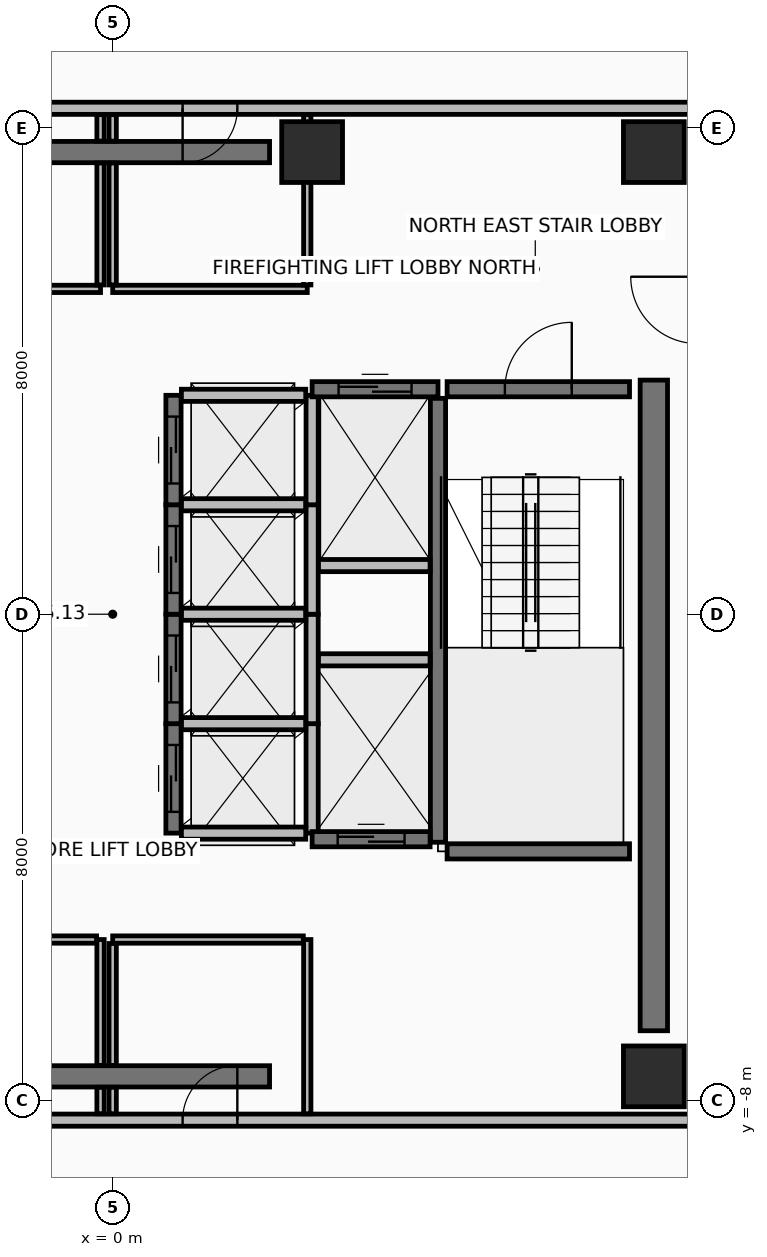
"""IFC4 building model, lengths in metres.
Left out: names, types, materials, properties, quantities, classifications, styles, units other than length and angle.
Written with IfcOpenShell. Run it as: python <this file> out.ifc"""

import sys

from ifc_helpers import new_model, si_unit, direction, frame, frame_2d, origin, origin_2d, place, context, subcontext, project, spatial, rectangle, extrude, element, fill, save


model = new_model("IFC4")
c1 = context("Model", 3, precision=1e-05, world=origin(), true_north=direction((0.0, 1.0)))
c2 = subcontext(c1, "Body", "Model", "MODEL_VIEW")
j1 = project(units=[si_unit("LENGTHUNIT", "METRE"), si_unit("PLANEANGLEUNIT", "RADIAN")], contexts=[c1])
p1 = place(None, origin())
s1 = spatial("IfcSite", under=j1, at=p1, CompositionType="ELEMENT")
p2 = place(p1, origin())
s2 = spatial("IfcBuilding", under=s1, at=p2, CompositionType="ELEMENT")
p3 = place(p2, frame((0.0, 0.0, 302.15)))
s3 = spatial("IfcBuildingStorey", under=s2, at=p3, CompositionType="ELEMENT", Elevation=302.15)
for number, where, z_axis, x_axis in (
    (1, (8.9, -7.6, 0.0), (0.0, 0.0, 1.0), (1.0, 0.0, 0.0)),
    (2, (8.9, 7.6, 0.0), (0.0, 0.0, 1.0), (1.0, 0.0, 0.0)),
    (3, (3.28, 7.6, 0.0), (0.0, 0.0, 1.0), (1.0, 0.0, 0.0)),
):
    element("IfcColumn", number, at=place(p3, frame(where, z_axis=z_axis, x_axis=x_axis)), inside=s3, PredefinedType="COLUMN", context=c2, shape_type="SweptSolid", body=[
        extrude(rectangle(XDim=1.0, YDim=1.0, at=origin_2d()), origin(), (0.0, 0.0, 1.0), 4.15),
    ])
for number, where, z_axis, x_axis in (
    (4, (-2.8, -7.6, 0.0), (0.0, 0.0, 1.0), (1.0, 0.0, 0.0)),
    (5, (-2.8, 7.6, 0.0), (0.0, 0.0, 1.0), (1.0, 0.0, 0.0)),
):
    element("IfcWall", number, at=place(p3, frame(where, z_axis=z_axis, x_axis=x_axis)), inside=s3, PredefinedType="SHEAR", context=c2, shape_type="SweptSolid", body=[
        extrude(rectangle(XDim=5.38, YDim=0.35, at=frame_2d((2.69, 0.0))), origin(), (0.0, 0.0, 1.0), 3.95),
    ])
p4 = place(p3, frame((8.9, -6.85, 0.0), z_axis=(0.0, 0.0, 1.0), x_axis=(0.0, 1.0, 0.0)))
e6 = element("IfcWall", 6, at=p4, inside=s3, PredefinedType="SHEAR", context=c2, shape_type="SweptSolid", body=[
    extrude(rectangle(XDim=10.7, YDim=0.45, at=frame_2d((5.35, 0.0))), origin(), (0.0, 0.0, 1.0), 3.95),
])
p5 = place(p3, frame((-9.62, -8.32, 0.0), z_axis=(0.0, 0.0, 1.0), x_axis=(1.0, 0.0, 0.0)))
e7 = element("IfcWall", 7, at=p5, inside=s3, PredefinedType="PARTITIONING", context=c2, shape_type="SweptSolid", body=[
    extrude(rectangle(XDim=19.24, YDim=0.2, at=frame_2d((9.62, 0.0))), origin(), (0.0, 0.0, 1.0), 3.445),
])
p6 = place(p5, frame((7.37, 0.0, 0.0)))
e8 = element("IfcOpeningElement", 8, at=p6, cuts=e7, PredefinedType="OPENING", context=c2, shape_type="SweptSolid", body=[
    extrude(rectangle(XDim=0.9, YDim=2.1, at=frame_2d((0.45, 1.05))), frame((0.0, 0.11, 0.0), z_axis=(0.0, -1.0, 0.0), x_axis=(1.0, 0.0, 0.0)), (0.0, 0.0, 1.0), 0.22),
])
p7 = place(p5, frame((10.77, 0.0, 0.0)))
e9 = element("IfcOpeningElement", 9, at=p7, cuts=e7, PredefinedType="OPENING", context=c2, shape_type="SweptSolid", body=[
    extrude(rectangle(XDim=0.9, YDim=2.1, at=frame_2d((0.45, 1.05))), frame((0.0, 0.11, 0.0), z_axis=(0.0, -1.0, 0.0), x_axis=(1.0, 0.0, 0.0)), (0.0, 0.0, 1.0), 0.22),
])
p8 = place(p3, frame((9.62, 8.32, 0.0), z_axis=(0.0, 0.0, 1.0), x_axis=(-1.0, 0.0, 0.0)))
e10 = element("IfcWall", 10, at=p8, inside=s3, PredefinedType="PARTITIONING", context=c2, shape_type="SweptSolid", body=[
    extrude(rectangle(XDim=19.24, YDim=0.2, at=frame_2d((9.62, 0.0))), origin(), (0.0, 0.0, 1.0), 3.445),
])
p9 = place(p8, frame((10.97, 0.0, 0.0)))
e11 = element("IfcOpeningElement", 11, at=p9, cuts=e10, PredefinedType="OPENING", context=c2, shape_type="SweptSolid", body=[
    extrude(rectangle(XDim=0.9, YDim=2.1, at=frame_2d((0.45, 1.05))), frame((0.0, 0.11, 0.0), z_axis=(0.0, -1.0, 0.0), x_axis=(1.0, 0.0, 0.0)), (0.0, 0.0, 1.0), 0.22),
])
p10 = place(p8, frame((7.57, 0.0, 0.0)))
e12 = element("IfcOpeningElement", 12, at=p10, cuts=e10, PredefinedType="OPENING", context=c2, shape_type="SweptSolid", body=[
    extrude(rectangle(XDim=0.9, YDim=2.1, at=frame_2d((0.45, 1.05))), frame((0.0, 0.11, 0.0), z_axis=(0.0, -1.0, 0.0), x_axis=(1.0, 0.0, 0.0)), (0.0, 0.0, 1.0), 0.22),
])
p11 = place(p8, frame((15.02, 0.0, 0.0)))
e13 = element("IfcOpeningElement", 13, at=p11, cuts=e10, PredefinedType="OPENING", context=c2, shape_type="SweptSolid", body=[
    extrude(rectangle(XDim=0.9, YDim=2.1, at=frame_2d((0.45, 1.05))), frame((0.0, 0.11, 0.0), z_axis=(0.0, -1.0, 0.0), x_axis=(1.0, 0.0, 0.0)), (0.0, 0.0, 1.0), 0.22),
])
p12 = place(p3, frame((5.35, -3.75, 0.0), z_axis=(0.0, 0.0, 1.0), x_axis=(0.0, 1.0, 0.0)))
e14 = element("IfcWall", 14, at=p12, inside=s3, PredefinedType="SHEAR", context=c2, shape_type="SweptSolid", body=[
    extrude(rectangle(XDim=7.3, YDim=0.25, at=frame_2d((3.65, 0.0))), origin(), (0.0, 0.0, 1.0), 3.95),
])
p13 = place(p3, frame((5.5, 3.7, 0.0), z_axis=(0.0, 0.0, 1.0), x_axis=(1.0, 0.0, 0.0)))
e15 = element("IfcWall", 15, at=p13, inside=s3, PredefinedType="SHEAR", context=c2, shape_type="SweptSolid", body=[
    extrude(rectangle(XDim=3.0, YDim=0.25, at=frame_2d((1.5, 0.0))), origin(), (0.0, 0.0, 1.0), 3.95),
])
p14 = place(p13, frame((0.95, 0.0, 0.0)))
e16 = element("IfcOpeningElement", 16, at=p14, cuts=e15, PredefinedType="OPENING", context=c2, shape_type="SweptSolid", body=[
    extrude(rectangle(XDim=1.1, YDim=2.15, at=frame_2d((0.55, 1.075))), frame((0.0, 0.135, 0.0), z_axis=(0.0, -1.0, 0.0), x_axis=(1.0, 0.0, 0.0)), (0.0, 0.0, 1.0), 0.27),
])
p15 = place(p3, frame((5.5, -3.9, 0.0), z_axis=(0.0, 0.0, 1.0), x_axis=(1.0, 0.0, 0.0)))
e17 = element("IfcWall", 17, at=p15, inside=s3, PredefinedType="SHEAR", context=c2, shape_type="SweptSolid", body=[
    extrude(rectangle(XDim=3.0, YDim=0.25, at=frame_2d((1.5, 0.0))), origin(), (0.0, 0.0, 1.0), 3.95),
])
p16 = place(p3, frame((1.0, -3.6, 0.0), z_axis=(0.0, 0.0, 1.0), x_axis=(0.0, 1.0, 0.0)))
e18 = element("IfcWall", 18, at=p16, inside=s3, PredefinedType="SHEAR", context=c2, shape_type="SweptSolid", body=[
    extrude(rectangle(XDim=1.8, YDim=0.25, at=frame_2d((0.9, 0.0))), origin(), (0.0, 0.0, 1.0), 3.95),
])
p17 = place(p16, frame((0.35, 0.0, 0.0)))
e19 = element("IfcOpeningElement", 19, at=p17, cuts=e18, PredefinedType="OPENING", context=c2, shape_type="SweptSolid", body=[
    extrude(rectangle(XDim=1.1, YDim=2.2, at=frame_2d((0.55, 1.1))), frame((0.0, 0.135, 0.0), z_axis=(0.0, -1.0, 0.0), x_axis=(1.0, 0.0, 0.0)), (0.0, 0.0, 1.0), 0.27),
])
p18 = place(p3, frame((3.28, -3.6, 0.0), z_axis=(0.0, 0.0, 1.0), x_axis=(0.0, 1.0, 0.0)))
e20 = element("IfcWall", 20, at=p18, inside=s3, PredefinedType="PARTITIONING", context=c2, shape_type="SweptSolid", body=[
    extrude(rectangle(XDim=1.8, YDim=0.2, at=frame_2d((0.9, 0.0))), origin(), (0.0, 0.0, 1.0), 3.95),
])
for number, where, z_axis, x_axis in (
    (21, (1.13, -3.6, 0.0), (0.0, 0.0, 1.0), (1.0, 0.0, 0.0)),
    (22, (1.13, -1.8, 0.0), (0.0, 0.0, 1.0), (1.0, 0.0, 0.0)),
):
    element("IfcWall", number, at=place(p3, frame(where, z_axis=z_axis, x_axis=x_axis)), inside=s3, PredefinedType="PARTITIONING", context=c2, shape_type="SweptSolid", body=[
        extrude(rectangle(XDim=2.045, YDim=0.2, at=frame_2d((1.022, 0.0))), origin(), (0.0, 0.0, 1.0), 3.95),
    ])
p19 = place(p3, frame((1.0, -1.8, 0.0), z_axis=(0.0, 0.0, 1.0), x_axis=(0.0, 1.0, 0.0)))
e23 = element("IfcWall", 23, at=p19, inside=s3, PredefinedType="SHEAR", context=c2, shape_type="SweptSolid", body=[
    extrude(rectangle(XDim=1.8, YDim=0.25, at=frame_2d((0.9, 0.0))), origin(), (0.0, 0.0, 1.0), 3.95),
])
p20 = place(p19, frame((0.35, 0.0, 0.0)))
e24 = element("IfcOpeningElement", 24, at=p20, cuts=e23, PredefinedType="OPENING", context=c2, shape_type="SweptSolid", body=[
    extrude(rectangle(XDim=1.1, YDim=2.2, at=frame_2d((0.55, 1.1))), frame((0.0, 0.135, 0.0), z_axis=(0.0, -1.0, 0.0), x_axis=(1.0, 0.0, 0.0)), (0.0, 0.0, 1.0), 0.27),
])
p21 = place(p3, frame((3.28, -1.8, 0.0), z_axis=(0.0, 0.0, 1.0), x_axis=(0.0, 1.0, 0.0)))
e25 = element("IfcWall", 25, at=p21, inside=s3, PredefinedType="PARTITIONING", context=c2, shape_type="SweptSolid", body=[
    extrude(rectangle(XDim=1.8, YDim=0.2, at=frame_2d((0.9, 0.0))), origin(), (0.0, 0.0, 1.0), 3.95),
])
p22 = place(p3, frame((1.13, 0.0, 0.0), z_axis=(0.0, 0.0, 1.0), x_axis=(1.0, 0.0, 0.0)))
e26 = element("IfcWall", 26, at=p22, inside=s3, PredefinedType="PARTITIONING", context=c2, shape_type="SweptSolid", body=[
    extrude(rectangle(XDim=2.045, YDim=0.2, at=frame_2d((1.022, 0.0))), origin(), (0.0, 0.0, 1.0), 3.95),
])
p23 = place(p3, frame((1.0, 0.0, 0.0), z_axis=(0.0, 0.0, 1.0), x_axis=(0.0, 1.0, 0.0)))
e27 = element("IfcWall", 27, at=p23, inside=s3, PredefinedType="SHEAR", context=c2, shape_type="SweptSolid", body=[
    extrude(rectangle(XDim=1.8, YDim=0.25, at=frame_2d((0.9, 0.0))), origin(), (0.0, 0.0, 1.0), 3.95),
])
p24 = place(p23, frame((0.35, 0.0, 0.0)))
e28 = element("IfcOpeningElement", 28, at=p24, cuts=e27, PredefinedType="OPENING", context=c2, shape_type="SweptSolid", body=[
    extrude(rectangle(XDim=1.1, YDim=2.2, at=frame_2d((0.55, 1.1))), frame((0.0, 0.135, 0.0), z_axis=(0.0, -1.0, 0.0), x_axis=(1.0, 0.0, 0.0)), (0.0, 0.0, 1.0), 0.27),
])
p25 = place(p3, frame((3.28, 0.0, 0.0), z_axis=(0.0, 0.0, 1.0), x_axis=(0.0, 1.0, 0.0)))
e29 = element("IfcWall", 29, at=p25, inside=s3, PredefinedType="PARTITIONING", context=c2, shape_type="SweptSolid", body=[
    extrude(rectangle(XDim=1.8, YDim=0.2, at=frame_2d((0.9, 0.0))), origin(), (0.0, 0.0, 1.0), 3.95),
])
p26 = place(p3, frame((1.13, 1.8, 0.0), z_axis=(0.0, 0.0, 1.0), x_axis=(1.0, 0.0, 0.0)))
e30 = element("IfcWall", 30, at=p26, inside=s3, PredefinedType="PARTITIONING", context=c2, shape_type="SweptSolid", body=[
    extrude(rectangle(XDim=2.045, YDim=0.2, at=frame_2d((1.022, 0.0))), origin(), (0.0, 0.0, 1.0), 3.95),
])
p27 = place(p3, frame((1.0, 1.8, 0.0), z_axis=(0.0, 0.0, 1.0), x_axis=(0.0, 1.0, 0.0)))
e31 = element("IfcWall", 31, at=p27, inside=s3, PredefinedType="SHEAR", context=c2, shape_type="SweptSolid", body=[
    extrude(rectangle(XDim=1.8, YDim=0.25, at=frame_2d((0.9, 0.0))), origin(), (0.0, 0.0, 1.0), 3.95),
])
p28 = place(p27, frame((0.35, 0.0, 0.0)))
e32 = element("IfcOpeningElement", 32, at=p28, cuts=e31, PredefinedType="OPENING", context=c2, shape_type="SweptSolid", body=[
    extrude(rectangle(XDim=1.1, YDim=2.2, at=frame_2d((0.55, 1.1))), frame((0.0, 0.135, 0.0), z_axis=(0.0, -1.0, 0.0), x_axis=(1.0, 0.0, 0.0)), (0.0, 0.0, 1.0), 0.27),
])
p29 = place(p3, frame((3.28, 1.8, 0.0), z_axis=(0.0, 0.0, 1.0), x_axis=(0.0, 1.0, 0.0)))
e33 = element("IfcWall", 33, at=p29, inside=s3, PredefinedType="PARTITIONING", context=c2, shape_type="SweptSolid", body=[
    extrude(rectangle(XDim=1.8, YDim=0.2, at=frame_2d((0.9, 0.0))), origin(), (0.0, 0.0, 1.0), 3.95),
])
p30 = place(p3, frame((1.13, 3.6, 0.0), z_axis=(0.0, 0.0, 1.0), x_axis=(1.0, 0.0, 0.0)))
e34 = element("IfcWall", 34, at=p30, inside=s3, PredefinedType="PARTITIONING", context=c2, shape_type="SweptSolid", body=[
    extrude(rectangle(XDim=2.045, YDim=0.2, at=frame_2d((1.022, 0.0))), origin(), (0.0, 0.0, 1.0), 3.245),
])
p31 = place(p3, frame((3.28, 3.7, 0.0), z_axis=(0.0, 0.0, 1.0), x_axis=(1.0, 0.0, 0.0)))
e35 = element("IfcWall", 35, at=p31, inside=s3, PredefinedType="SHEAR", context=c2, shape_type="SweptSolid", body=[
    extrude(rectangle(XDim=2.07, YDim=0.25, at=frame_2d((1.035, 0.0))), origin(), (0.0, 0.0, 1.0), 3.95),
])
p32 = place(p31, frame((0.435, 0.0, 0.0)))
e36 = element("IfcOpeningElement", 36, at=p32, cuts=e35, PredefinedType="OPENING", context=c2, shape_type="SweptSolid", body=[
    extrude(rectangle(XDim=1.2, YDim=2.2, at=frame_2d((0.6, 1.1))), frame((0.0, 0.135, 0.0), z_axis=(0.0, -1.0, 0.0), x_axis=(1.0, 0.0, 0.0)), (0.0, 0.0, 1.0), 0.27),
])
p33 = place(p3, frame((3.385, 0.8, 0.0), z_axis=(0.0, 0.0, 1.0), x_axis=(1.0, 0.0, 0.0)))
e37 = element("IfcWall", 37, at=p33, inside=s3, PredefinedType="PARTITIONING", context=c2, shape_type="SweptSolid", body=[
    extrude(rectangle(XDim=1.835, YDim=0.2, at=frame_2d((0.917, 0.0))), origin(), (0.0, 0.0, 1.0), 3.95),
])
p34 = place(p3, frame((3.28, -3.7, 0.0), z_axis=(0.0, 0.0, 1.0), x_axis=(1.0, 0.0, 0.0)))
e38 = element("IfcWall", 38, at=p34, inside=s3, PredefinedType="SHEAR", context=c2, shape_type="SweptSolid", body=[
    extrude(rectangle(XDim=1.94, YDim=0.25, at=frame_2d((0.97, 0.0))), origin(), (0.0, 0.0, 1.0), 3.95),
])
p35 = place(p34, frame((0.42, 0.0, 0.0)))
e39 = element("IfcOpeningElement", 39, at=p35, cuts=e38, PredefinedType="OPENING", context=c2, shape_type="SweptSolid", body=[
    extrude(rectangle(XDim=1.1, YDim=2.2, at=frame_2d((0.55, 1.1))), frame((0.0, 0.135, 0.0), z_axis=(0.0, -1.0, 0.0), x_axis=(1.0, 0.0, 0.0)), (0.0, 0.0, 1.0), 0.27),
])
p36 = place(p3, frame((3.385, -0.75, 0.0), z_axis=(0.0, 0.0, 1.0), x_axis=(1.0, 0.0, 0.0)))
e40 = element("IfcWall", 40, at=p36, inside=s3, PredefinedType="PARTITIONING", context=c2, shape_type="SweptSolid", body=[
    extrude(rectangle(XDim=1.835, YDim=0.2, at=frame_2d((0.917, 0.0))), origin(), (0.0, 0.0, 1.0), 3.95),
])
p37 = place(p3, frame((-0.2, -8.215, 0.0), z_axis=(0.0, 0.0, 1.0), x_axis=(0.0, 1.0, 0.0)))
e41 = element("IfcWall", 41, at=p37, inside=s3, PredefinedType="PARTITIONING", context=c2, shape_type="SweptSolid", body=[
    extrude(rectangle(XDim=0.435, YDim=0.12, at=frame_2d((0.218, 0.0))), origin(), (0.0, 0.0, 1.0), 3.245),
])
p38 = place(p3, frame((-0.2, -7.42, 0.0), z_axis=(0.0, 0.0, 1.0), x_axis=(0.0, 1.0, 0.0)))
e42 = element("IfcWall", 42, at=p38, inside=s3, PredefinedType="PARTITIONING", context=c2, shape_type="SweptSolid", body=[
    extrude(rectangle(XDim=2.07, YDim=0.12, at=frame_2d((1.035, 0.0))), origin(), (0.0, 0.0, 1.0), 3.245),
])
p39 = place(p3, frame((-0.265, -5.35, 0.0), z_axis=(0.0, 0.0, 1.0), x_axis=(-1.0, 0.0, 0.0)))
e43 = element("IfcWall", 43, at=p39, inside=s3, PredefinedType="PARTITIONING", context=c2, shape_type="SweptSolid", body=[
    extrude(rectangle(XDim=3.135, YDim=0.12, at=frame_2d((1.567, 0.0))), origin(), (0.0, 0.0, 1.0), 3.245),
])
p40 = place(p3, frame((3.2, -8.215, 0.0), z_axis=(0.0, 0.0, 1.0), x_axis=(0.0, 1.0, 0.0)))
e44 = element("IfcWall", 44, at=p40, inside=s3, PredefinedType="PARTITIONING", context=c2, shape_type="SweptSolid", body=[
    extrude(rectangle(XDim=2.865, YDim=0.12, at=frame_2d((1.433, 0.0))), origin(), (0.0, 0.0, 1.0), 3.245),
])
p41 = place(p3, frame((3.135, -5.35, 0.0), z_axis=(0.0, 0.0, 1.0), x_axis=(-1.0, 0.0, 0.0)))
e45 = element("IfcWall", 45, at=p41, inside=s3, PredefinedType="PARTITIONING", context=c2, shape_type="SweptSolid", body=[
    extrude(rectangle(XDim=3.135, YDim=0.12, at=frame_2d((1.567, 0.0))), origin(), (0.0, 0.0, 1.0), 3.95),
])
p42 = place(p3, frame((0.0, -5.415, 0.0), z_axis=(0.0, 0.0, 1.0), x_axis=(0.0, -1.0, 0.0)))
e46 = element("IfcWall", 46, at=p42, inside=s3, PredefinedType="PARTITIONING", context=c2, shape_type="SweptSolid", body=[
    extrude(rectangle(XDim=2.005, YDim=0.12, at=frame_2d((1.002, 0.0))), origin(), (0.0, 0.0, 1.0), 3.245),
])
p43 = place(p3, frame((0.0, -7.78, 0.0), z_axis=(0.0, 0.0, 1.0), x_axis=(0.0, -1.0, 0.0)))
e47 = element("IfcWall", 47, at=p43, inside=s3, PredefinedType="PARTITIONING", context=c2, shape_type="SweptSolid", body=[
    extrude(rectangle(XDim=0.435, YDim=0.12, at=frame_2d((0.218, 0.0))), origin(), (0.0, 0.0, 1.0), 3.245),
])
p44 = place(p3, frame((-3.4, 5.35, 0.0), z_axis=(0.0, 0.0, 1.0), x_axis=(1.0, 0.0, 0.0)))
e48 = element("IfcWall", 48, at=p44, inside=s3, PredefinedType="PARTITIONING", context=c2, shape_type="SweptSolid", body=[
    extrude(rectangle(XDim=3.2, YDim=0.12, at=frame_2d((1.6, 0.0))), origin(), (0.0, 0.0, 1.0), 3.95),
])
p45 = place(p3, frame((-0.2, 5.415, 0.0), z_axis=(0.0, 0.0, 1.0), x_axis=(0.0, 1.0, 0.0)))
e49 = element("IfcWall", 49, at=p45, inside=s3, PredefinedType="PARTITIONING", context=c2, shape_type="SweptSolid", body=[
    extrude(rectangle(XDim=2.005, YDim=0.12, at=frame_2d((1.002, 0.0))), origin(), (0.0, 0.0, 1.0), 3.245),
])
p46 = place(p3, frame((-0.2, 7.78, 0.0), z_axis=(0.0, 0.0, 1.0), x_axis=(0.0, 1.0, 0.0)))
e50 = element("IfcWall", 50, at=p46, inside=s3, PredefinedType="PARTITIONING", context=c2, shape_type="SweptSolid", body=[
    extrude(rectangle(XDim=0.435, YDim=0.12, at=frame_2d((0.218, 0.0))), origin(), (0.0, 0.0, 1.0), 3.245),
])
p47 = place(p3, frame((0.0, 5.35, 0.0), z_axis=(0.0, 0.0, 1.0), x_axis=(1.0, 0.0, 0.0)))
e51 = element("IfcWall", 51, at=p47, inside=s3, PredefinedType="PARTITIONING", context=c2, shape_type="SweptSolid", body=[
    extrude(rectangle(XDim=3.2, YDim=0.12, at=frame_2d((1.6, 0.0))), origin(), (0.0, 0.0, 1.0), 3.245),
])
p48 = place(p3, frame((3.2, 5.415, 0.0), z_axis=(0.0, 0.0, 1.0), x_axis=(0.0, 1.0, 0.0)))
e52 = element("IfcWall", 52, at=p48, inside=s3, PredefinedType="PARTITIONING", context=c2, shape_type="SweptSolid", body=[
    extrude(rectangle(XDim=2.8, YDim=0.12, at=frame_2d((1.4, 0.0))), origin(), (0.0, 0.0, 1.0), 3.245),
])
p49 = place(p3, frame((0.0, 8.215, 0.0), z_axis=(0.0, 0.0, 1.0), x_axis=(0.0, -1.0, 0.0)))
e53 = element("IfcWall", 53, at=p49, inside=s3, PredefinedType="PARTITIONING", context=c2, shape_type="SweptSolid", body=[
    extrude(rectangle(XDim=0.435, YDim=0.12, at=frame_2d((0.218, 0.0))), origin(), (0.0, 0.0, 1.0), 3.245),
])
p50 = place(p3, frame((0.0, 7.42, 0.0), z_axis=(0.0, 0.0, 1.0), x_axis=(0.0, -1.0, 0.0)))
e54 = element("IfcWall", 54, at=p50, inside=s3, PredefinedType="PARTITIONING", context=c2, shape_type="SweptSolid", body=[
    extrude(rectangle(XDim=2.005, YDim=0.12, at=frame_2d((1.002, 0.0))), origin(), (0.0, 0.0, 1.0), 3.245),
])
p51 = place(p14, frame((1.1, 0.0, 0.0), z_axis=(0.0, 0.0, 1.0), x_axis=(-1.0, 0.0, 0.0)))
e55 = element("IfcDoor", 55, at=p51, inside=s3, OperationType="SINGLE_SWING_LEFT", PredefinedType="DOOR", context=c2, shape_type="SweptSolid", body=[
    extrude(rectangle(XDim=1.1, YDim=2.15, at=frame_2d((0.55, 1.075))), frame((0.0, 0.025, 0.0), z_axis=(0.0, -1.0, 0.0), x_axis=(1.0, 0.0, 0.0)), (0.0, 0.0, 1.0), 0.05),
])
fill(e16, e55)
p52 = place(p17, origin())
e56 = element("IfcDoor", 56, at=p52, inside=s3, OperationType="SLIDING_TO_LEFT", PredefinedType="DOOR", context=c2, shape_type="SweptSolid", body=[
    extrude(rectangle(XDim=1.1, YDim=2.2, at=frame_2d((0.55, 1.1))), frame((0.0, 0.025, 0.0), z_axis=(0.0, -1.0, 0.0), x_axis=(1.0, 0.0, 0.0)), (0.0, 0.0, 1.0), 0.05),
])
fill(e19, e56)
p53 = place(p20, origin())
e57 = element("IfcDoor", 57, at=p53, inside=s3, OperationType="SLIDING_TO_LEFT", PredefinedType="DOOR", context=c2, shape_type="SweptSolid", body=[
    extrude(rectangle(XDim=1.1, YDim=2.2, at=frame_2d((0.55, 1.1))), frame((0.0, 0.025, 0.0), z_axis=(0.0, -1.0, 0.0), x_axis=(1.0, 0.0, 0.0)), (0.0, 0.0, 1.0), 0.05),
])
fill(e24, e57)
p54 = place(p24, origin())
e58 = element("IfcDoor", 58, at=p54, inside=s3, OperationType="SLIDING_TO_LEFT", PredefinedType="DOOR", context=c2, shape_type="SweptSolid", body=[
    extrude(rectangle(XDim=1.1, YDim=2.2, at=frame_2d((0.55, 1.1))), frame((0.0, 0.025, 0.0), z_axis=(0.0, -1.0, 0.0), x_axis=(1.0, 0.0, 0.0)), (0.0, 0.0, 1.0), 0.05),
])
fill(e28, e58)
p55 = place(p28, origin())
e59 = element("IfcDoor", 59, at=p55, inside=s3, OperationType="SLIDING_TO_LEFT", PredefinedType="DOOR", context=c2, shape_type="SweptSolid", body=[
    extrude(rectangle(XDim=1.1, YDim=2.2, at=frame_2d((0.55, 1.1))), frame((0.0, 0.025, 0.0), z_axis=(0.0, -1.0, 0.0), x_axis=(1.0, 0.0, 0.0)), (0.0, 0.0, 1.0), 0.05),
])
fill(e32, e59)
p56 = place(p32, origin())
e60 = element("IfcDoor", 60, at=p56, inside=s3, OperationType="SLIDING_TO_RIGHT", PredefinedType="DOOR", context=c2, shape_type="SweptSolid", body=[
    extrude(rectangle(XDim=1.2, YDim=2.2, at=frame_2d((0.6, 1.1))), frame((0.0, 0.025, 0.0), z_axis=(0.0, -1.0, 0.0), x_axis=(1.0, 0.0, 0.0)), (0.0, 0.0, 1.0), 0.05),
])
fill(e36, e60)
p57 = place(p35, origin())
e61 = element("IfcDoor", 61, at=p57, inside=s3, OperationType="SLIDING_TO_LEFT", PredefinedType="DOOR", context=c2, shape_type="SweptSolid", body=[
    extrude(rectangle(XDim=1.1, YDim=2.2, at=frame_2d((0.55, 1.1))), frame((0.0, 0.025, 0.0), z_axis=(0.0, -1.0, 0.0), x_axis=(1.0, 0.0, 0.0)), (0.0, 0.0, 1.0), 0.05),
])
fill(e39, e61)
p58 = place(p7, frame((0.9, 0.0, 0.0), z_axis=(0.0, 0.0, 1.0), x_axis=(-1.0, 0.0, 0.0)))
e62 = element("IfcDoor", 62, at=p58, inside=s3, OperationType="SINGLE_SWING_LEFT", PredefinedType="DOOR", context=c2, shape_type="SweptSolid", body=[
    extrude(rectangle(XDim=0.9, YDim=2.1, at=frame_2d((0.45, 1.05))), frame((0.0, 0.025, 0.0), z_axis=(0.0, -1.0, 0.0), x_axis=(1.0, 0.0, 0.0)), (0.0, 0.0, 1.0), 0.05),
])
fill(e9, e62)
p59 = place(p10, frame((0.9, 0.0, 0.0), z_axis=(0.0, 0.0, 1.0), x_axis=(-1.0, 0.0, 0.0)))
e63 = element("IfcDoor", 63, at=p59, inside=s3, OperationType="SINGLE_SWING_LEFT", PredefinedType="DOOR", context=c2, shape_type="SweptSolid", body=[
    extrude(rectangle(XDim=0.9, YDim=2.1, at=frame_2d((0.45, 1.05))), frame((0.0, 0.025, 0.0), z_axis=(0.0, -1.0, 0.0), x_axis=(1.0, 0.0, 0.0)), (0.0, 0.0, 1.0), 0.05),
])
fill(e12, e63)
save(model, sys.argv[1])
